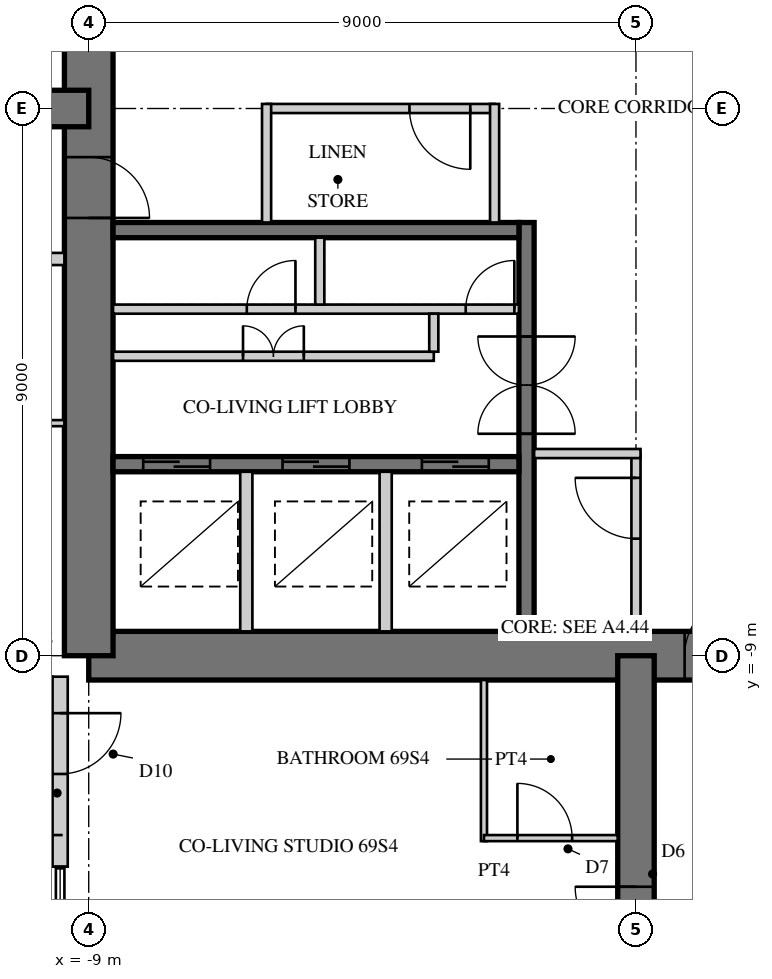
"""IFC4 building model, lengths in metres.
Left out: names, types, materials, properties, quantities, classifications, styles, units other than length and angle.
Written with IfcOpenShell. Run it as: python <this file> out.ifc"""

import sys

from ifc_helpers import new_model, si_unit, direction, frame, frame_2d, origin, place, context, subcontext, project, spatial, rectangle, hollow_rectangle, extrude, element, fill, save


model = new_model("IFC4")
c1 = context("Model", 3, precision=1e-05, world=origin(), true_north=direction((0.0, 1.0)))
c2 = subcontext(c1, "Body", "Model", "MODEL_VIEW")
j1 = project(units=[si_unit("LENGTHUNIT", "METRE"), si_unit("PLANEANGLEUNIT", "RADIAN")], contexts=[c1])
p1 = place(None, origin())
s1 = spatial("IfcSite", under=j1, at=p1, CompositionType="ELEMENT")
p2 = place(p1, origin())
s2 = spatial("IfcBuilding", under=s1, at=p2, CompositionType="ELEMENT")
p3 = place(p2, frame((0.0, 0.0, 267.9)))
s3 = spatial("IfcBuildingStorey", under=s2, at=p3, CompositionType="ELEMENT", Elevation=267.9)
p4 = place(p3, frame((-9.0, -9.0, 0.0), z_axis=(0.0, 0.0, 1.0), x_axis=(1.0, 0.0, 0.0)))
e1 = element("IfcWall", 1, at=p4, inside=s3, PredefinedType="SHEAR", context=c2, shape_type="SweptSolid", body=[
    extrude(rectangle(XDim=18.0, YDim=0.8, at=frame_2d((9.0, 0.0))), origin(), (0.0, 0.0, 1.0), 3.4),
])
p5 = place(p4, frame((9.8, 0.0, 0.0)))
e2 = element("IfcOpeningElement", 2, at=p5, cuts=e1, PredefinedType="OPENING", context=c2, shape_type="SweptSolid", body=[
    extrude(rectangle(XDim=1.0, YDim=2.4, at=frame_2d((0.5, 1.2))), frame((0.0, 0.41, 0.0), z_axis=(0.0, -1.0, 0.0), x_axis=(1.0, 0.0, 0.0)), (0.0, 0.0, 1.0), 0.82),
])
p6 = place(p3, frame((-9.0, 9.0, 0.0), z_axis=(0.0, 0.0, 1.0), x_axis=(0.0, -1.0, 0.0)))
e3 = element("IfcWall", 3, at=p6, inside=s3, PredefinedType="SHEAR", context=c2, shape_type="SweptSolid", body=[
    extrude(rectangle(XDim=18.0, YDim=0.8, at=frame_2d((9.0, 0.0))), origin(), (0.0, 0.0, 1.0), 3.4),
])
p7 = place(p6, frame((9.8, 0.0, 0.0)))
e4 = element("IfcOpeningElement", 4, at=p7, cuts=e3, PredefinedType="OPENING", context=c2, shape_type="SweptSolid", body=[
    extrude(rectangle(XDim=1.0, YDim=2.4, at=frame_2d((0.5, 1.2))), frame((0.0, 0.41, 0.0), z_axis=(0.0, -1.0, 0.0), x_axis=(1.0, 0.0, 0.0)), (0.0, 0.0, 1.0), 0.82),
])
p8 = place(p3, frame((-1.8, -1.875, 0.0), z_axis=(0.0, 0.0, 1.0), x_axis=(0.0, -1.0, 0.0)))
e5 = element("IfcWall", 5, at=p8, inside=s3, PredefinedType="SHEAR", context=c2, shape_type="SweptSolid", body=[
    extrude(rectangle(XDim=6.725, YDim=0.25, at=frame_2d((3.363, 0.0))), origin(), (0.0, 0.0, 1.0), 3.4),
])
p9 = place(p8, frame((1.875, 0.0, 0.0)))
e6 = element("IfcOpeningElement", 6, at=p9, cuts=e5, PredefinedType="OPENING", context=c2, shape_type="SweptSolid", body=[
    extrude(rectangle(XDim=1.6, YDim=2.4, at=frame_2d((0.8, 1.2))), frame((0.0, 0.135, 0.0), z_axis=(0.0, -1.0, 0.0), x_axis=(1.0, 0.0, 0.0)), (0.0, 0.0, 1.0), 0.27),
])
p10 = place(p3, frame((-1.925, -2.0, 0.0), z_axis=(0.0, 0.0, 1.0), x_axis=(-1.0, 0.0, 0.0)))
e7 = element("IfcWall", 7, at=p10, inside=s3, PredefinedType="SHEAR", context=c2, shape_type="SweptSolid", body=[
    extrude(rectangle(XDim=6.675, YDim=0.25, at=frame_2d((3.337, 0.0))), origin(), (0.0, 0.0, 1.0), 3.4),
])
p11 = place(p3, frame((-1.925, -5.85, 0.0), z_axis=(0.0, 0.0, 1.0), x_axis=(-1.0, 0.0, 0.0)))
e8 = element("IfcWall", 8, at=p11, inside=s3, PredefinedType="SHEAR", context=c2, shape_type="SweptSolid", body=[
    extrude(rectangle(XDim=6.675, YDim=0.25, at=frame_2d((3.337, 0.0))), origin(), (0.0, 0.0, 1.0), 3.4),
])
p12 = place(p11, frame((0.496, 0.0, 0.0)))
e9 = element("IfcOpeningElement", 9, at=p12, cuts=e8, PredefinedType="OPENING", context=c2, shape_type="SweptSolid", body=[
    extrude(rectangle(XDim=1.1, YDim=2.2, at=frame_2d((0.55, 1.1))), frame((0.0, 0.135, 0.0), z_axis=(0.0, -1.0, 0.0), x_axis=(1.0, 0.0, 0.0)), (0.0, 0.0, 1.0), 0.27),
])
p13 = place(p11, frame((2.788, 0.0, 0.0)))
e10 = element("IfcOpeningElement", 10, at=p13, cuts=e8, PredefinedType="OPENING", context=c2, shape_type="SweptSolid", body=[
    extrude(rectangle(XDim=1.1, YDim=2.2, at=frame_2d((0.55, 1.1))), frame((0.0, 0.135, 0.0), z_axis=(0.0, -1.0, 0.0), x_axis=(1.0, 0.0, 0.0)), (0.0, 0.0, 1.0), 0.27),
])
p14 = place(p11, frame((5.079, 0.0, 0.0)))
e11 = element("IfcOpeningElement", 11, at=p14, cuts=e8, PredefinedType="OPENING", context=c2, shape_type="SweptSolid", body=[
    extrude(rectangle(XDim=1.1, YDim=2.2, at=frame_2d((0.55, 1.1))), frame((0.0, 0.135, 0.0), z_axis=(0.0, -1.0, 0.0), x_axis=(1.0, 0.0, 0.0)), (0.0, 0.0, 1.0), 0.27),
])
p15 = place(p3, frame((-1.925, -3.3, 0.0), z_axis=(0.0, 0.0, 1.0), x_axis=(-1.0, 0.0, 0.0)))
e12 = element("IfcWall", 12, at=p15, inside=s3, PredefinedType="PARTITIONING", context=c2, shape_type="SweptSolid", body=[
    extrude(rectangle(XDim=6.675, YDim=0.15, at=frame_2d((3.337, 0.0))), origin(), (0.0, 0.0, 1.0), 3.4),
])
p16 = place(p15, frame((0.075, 0.0, 0.0)))
e13 = element("IfcOpeningElement", 13, at=p16, cuts=e12, PredefinedType="OPENING", context=c2, shape_type="SweptSolid", body=[
    extrude(rectangle(XDim=0.8, YDim=2.1, at=frame_2d((0.4, 1.05))), frame((0.0, 0.085, 0.0), z_axis=(0.0, -1.0, 0.0), x_axis=(1.0, 0.0, 0.0)), (0.0, 0.0, 1.0), 0.17),
])
p17 = place(p15, frame((3.675, 0.0, 0.0)))
e14 = element("IfcOpeningElement", 14, at=p17, cuts=e12, PredefinedType="OPENING", context=c2, shape_type="SweptSolid", body=[
    extrude(rectangle(XDim=0.8, YDim=2.1, at=frame_2d((0.4, 1.05))), frame((0.0, 0.085, 0.0), z_axis=(0.0, -1.0, 0.0), x_axis=(1.0, 0.0, 0.0)), (0.0, 0.0, 1.0), 0.17),
])
p18 = place(p3, frame((-5.2, -2.125, 0.0), z_axis=(0.0, 0.0, 1.0), x_axis=(0.0, -1.0, 0.0)))
e15 = element("IfcWall", 15, at=p18, inside=s3, PredefinedType="PARTITIONING", context=c2, shape_type="SweptSolid", body=[
    extrude(rectangle(XDim=1.1, YDim=0.15, at=frame_2d((0.55, 0.0))), origin(), (0.0, 0.0, 1.0), 3.4),
])
for number, where, z_axis, x_axis in (
    (16, (-4.117, -5.975, 0.0), (0.0, 0.0, 1.0), (0.0, -1.0, 0.0)),
    (17, (-6.408, -5.975, 0.0), (0.0, 0.0, 1.0), (0.0, -1.0, 0.0)),
):
    element("IfcWall", number, at=place(p3, frame(where, z_axis=z_axis, x_axis=x_axis)), inside=s3, PredefinedType="PARTITIONING", context=c2, shape_type="SweptSolid", body=[
        extrude(rectangle(XDim=2.625, YDim=0.2, at=frame_2d((1.312, 0.0))), origin(), (0.0, 0.0, 1.0), 3.4),
    ])
p19 = place(p3, frame((0.0, -9.0, 0.0), z_axis=(0.0, 0.0, 1.0), x_axis=(0.0, -1.0, 0.0)))
e18 = element("IfcWall", 18, at=p19, inside=s3, PredefinedType="SHEAR", context=c2, shape_type="SweptSolid", body=[
    extrude(rectangle(XDim=9.0, YDim=0.6, at=frame_2d((4.5, 0.0))), origin(), (0.0, 0.0, 1.0), 3.4),
])
p20 = place(p19, frame((3.8, 0.0, 0.0)))
e19 = element("IfcOpeningElement", 19, at=p20, cuts=e18, PredefinedType="OPENING", context=c2, shape_type="SweptSolid", body=[
    extrude(rectangle(XDim=1.0, YDim=2.15, at=frame_2d((0.5, 1.075))), frame((0.0, 0.31, 0.0), z_axis=(0.0, -1.0, 0.0), x_axis=(1.0, 0.0, 0.0)), (0.0, 0.0, 1.0), 0.62),
])
p21 = place(p19, frame((7.0, 0.0, 0.0)))
e20 = element("IfcOpeningElement", 20, at=p21, cuts=e18, PredefinedType="OPENING", context=c2, shape_type="SweptSolid", body=[
    extrude(rectangle(XDim=1.0, YDim=2.2, at=frame_2d((0.5, 1.1))), frame((0.0, 0.31, 0.0), z_axis=(0.0, -1.0, 0.0), x_axis=(1.0, 0.0, 0.0)), (0.0, 0.0, 1.0), 0.62),
])
p22 = place(p3, frame((-9.0, 0.0, 0.0), z_axis=(0.0, 0.0, 1.0), x_axis=(-1.0, 0.0, 0.0)))
e21 = element("IfcWall", 21, at=p22, inside=s3, PredefinedType="SHEAR", context=c2, shape_type="SweptSolid", body=[
    extrude(rectangle(XDim=9.0, YDim=0.6, at=frame_2d((4.5, 0.0))), origin(), (0.0, 0.0, 1.0), 3.4),
])
p23 = place(p22, frame((3.8, 0.0, 0.0)))
e22 = element("IfcOpeningElement", 22, at=p23, cuts=e21, PredefinedType="OPENING", context=c2, shape_type="SweptSolid", body=[
    extrude(rectangle(XDim=1.0, YDim=2.15, at=frame_2d((0.5, 1.075))), frame((0.0, 0.31, 0.0), z_axis=(0.0, -1.0, 0.0), x_axis=(1.0, 0.0, 0.0)), (0.0, 0.0, 1.0), 0.62),
])
p24 = place(p22, frame((7.0, 0.0, 0.0)))
e23 = element("IfcOpeningElement", 23, at=p24, cuts=e21, PredefinedType="OPENING", context=c2, shape_type="SweptSolid", body=[
    extrude(rectangle(XDim=1.0, YDim=2.2, at=frame_2d((0.5, 1.1))), frame((0.0, 0.31, 0.0), z_axis=(0.0, -1.0, 0.0), x_axis=(1.0, 0.0, 0.0)), (0.0, 0.0, 1.0), 0.62),
])
p25 = place(p3, frame((-12.47, -9.47, 0.0), z_axis=(0.0, 0.0, 1.0), x_axis=(1.0, 0.0, 0.0)))
e24 = element("IfcWall", 24, at=p25, inside=s3, PredefinedType="SOLIDWALL", context=c2, shape_type="SweptSolid", body=[
    extrude(rectangle(XDim=2.875, YDim=0.25, at=frame_2d((1.438, 0.0))), origin(), (0.0, 0.0, 1.0), 3.22),
])
p26 = place(p25, frame((0.6, 0.0, 0.0)))
e25 = element("IfcOpeningElement", 25, at=p26, cuts=e24, PredefinedType="OPENING", context=c2, shape_type="SweptSolid", body=[
    extrude(rectangle(XDim=1.0, YDim=2.2, at=frame_2d((0.5, 1.1))), frame((0.0, 0.135, 0.0), z_axis=(0.0, -1.0, 0.0), x_axis=(1.0, 0.0, 0.0)), (0.0, 0.0, 1.0), 0.27),
])
p27 = place(p3, frame((-9.47, -9.345, 0.0), z_axis=(0.0, 0.0, 1.0), x_axis=(0.0, -1.0, 0.0)))
e26 = element("IfcWall", 26, at=p27, inside=s3, PredefinedType="SOLIDWALL", context=c2, shape_type="SweptSolid", body=[
    extrude(rectangle(XDim=3.125, YDim=0.25, at=frame_2d((1.562, 0.0))), origin(), (0.0, 0.0, 1.0), 3.22),
])
p28 = place(p27, frame((0.6, 0.0, 0.0)))
e27 = element("IfcOpeningElement", 27, at=p28, cuts=e26, PredefinedType="OPENING", context=c2, shape_type="SweptSolid", body=[
    extrude(rectangle(XDim=1.0, YDim=2.2, at=frame_2d((0.5, 1.1))), frame((0.0, 0.135, 0.0), z_axis=(0.0, -1.0, 0.0), x_axis=(1.0, 0.0, 0.0)), (0.0, 0.0, 1.0), 0.27),
])
p29 = place(p3, frame((-2.325, 0.0, 0.0), z_axis=(0.0, 0.0, 1.0), x_axis=(-1.0, 0.0, 0.0)))
e28 = element("IfcWall", 28, at=p29, inside=s3, PredefinedType="PARTITIONING", context=c2, shape_type="SweptSolid", body=[
    extrude(rectangle(XDim=3.75, YDim=0.15, at=frame_2d((1.875, 0.0))), origin(), (0.0, 0.0, 1.0), 3.22),
])
p30 = place(p29, frame((0.4, 0.0, 0.0)))
e29 = element("IfcOpeningElement", 29, at=p30, cuts=e28, PredefinedType="OPENING", context=c2, shape_type="SweptSolid", body=[
    extrude(rectangle(XDim=1.0, YDim=2.1, at=frame_2d((0.5, 1.05))), frame((0.0, 0.085, 0.0), z_axis=(0.0, -1.0, 0.0), x_axis=(1.0, 0.0, 0.0)), (0.0, 0.0, 1.0), 0.17),
])
for number, where, z_axis, x_axis in (
    (30, (-2.325, -1.875, 0.0), (0.0, 0.0, 1.0), (0.0, 1.0, 0.0)),
    (31, (-6.075, 0.075, 0.0), (0.0, 0.0, 1.0), (0.0, -1.0, 0.0)),
):
    element("IfcWall", number, at=place(p3, frame(where, z_axis=z_axis, x_axis=x_axis)), inside=s3, PredefinedType="PARTITIONING", context=c2, shape_type="SweptSolid", body=[
        extrude(rectangle(XDim=1.95, YDim=0.15, at=frame_2d((0.975, 0.0))), origin(), (0.0, 0.0, 1.0), 3.22),
    ])
p31 = place(p3, frame((0.0, -5.675, 0.0), z_axis=(0.0, 0.0, 1.0), x_axis=(0.0, -1.0, 0.0)))
e32 = element("IfcWall", 32, at=p31, inside=s3, PredefinedType="PARTITIONING", context=c2, shape_type="SweptSolid", body=[
    extrude(rectangle(XDim=2.925, YDim=0.15, at=frame_2d((1.462, 0.0))), origin(), (0.0, 0.0, 1.0), 3.22),
])
p32 = place(p31, frame((0.4, 0.0, 0.0)))
e33 = element("IfcOpeningElement", 33, at=p32, cuts=e32, PredefinedType="OPENING", context=c2, shape_type="SweptSolid", body=[
    extrude(rectangle(XDim=1.0, YDim=2.1, at=frame_2d((0.5, 1.05))), frame((0.0, 0.085, 0.0), z_axis=(0.0, -1.0, 0.0), x_axis=(1.0, 0.0, 0.0)), (0.0, 0.0, 1.0), 0.17),
])
p33 = place(p3, frame((-1.675, -5.675, 0.0), z_axis=(0.0, 0.0, 1.0), x_axis=(1.0, 0.0, 0.0)))
e34 = element("IfcWall", 34, at=p33, inside=s3, PredefinedType="PARTITIONING", context=c2, shape_type="SweptSolid", body=[
    extrude(rectangle(XDim=1.75, YDim=0.15, at=frame_2d((0.875, 0.0))), origin(), (0.0, 0.0, 1.0), 3.22),
])
p34 = place(p3, frame((-3.325, -4.075, 0.0), z_axis=(0.0, 0.0, 1.0), x_axis=(-1.0, 0.0, 0.0)))
e35 = element("IfcWall", 35, at=p34, inside=s3, PredefinedType="PARTITIONING", context=c2, shape_type="SweptSolid", body=[
    extrude(rectangle(XDim=5.275, YDim=0.15, at=frame_2d((2.638, 0.0))), origin(), (0.0, 0.0, 1.0), 3.22),
])
p35 = place(p34, frame((2.137, 0.0, 0.0)))
e36 = element("IfcOpeningElement", 36, at=p35, cuts=e35, PredefinedType="OPENING", context=c2, shape_type="SweptSolid", body=[
    extrude(rectangle(XDim=1.0, YDim=2.1, at=frame_2d((0.5, 1.05))), frame((0.0, 0.085, 0.0), z_axis=(0.0, -1.0, 0.0), x_axis=(1.0, 0.0, 0.0)), (0.0, 0.0, 1.0), 0.17),
])
p36 = place(p3, frame((-3.325, -3.375, 0.0), z_axis=(0.0, 0.0, 1.0), x_axis=(0.0, -1.0, 0.0)))
e37 = element("IfcWall", 37, at=p36, inside=s3, PredefinedType="PARTITIONING", context=c2, shape_type="SweptSolid", body=[
    extrude(rectangle(XDim=0.625, YDim=0.15, at=frame_2d((0.312, 0.0))), origin(), (0.0, 0.0, 1.0), 3.22),
])
p37 = place(p3, frame((-2.5, -9.4, 0.0), z_axis=(0.0, 0.0, 1.0), x_axis=(0.0, -1.0, 0.0)))
e38 = element("IfcWall", 38, at=p37, inside=s3, PredefinedType="PARTITIONING", context=c2, shape_type="SweptSolid", body=[
    extrude(rectangle(XDim=2.65, YDim=0.1, at=frame_2d((1.325, 0.0))), origin(), (0.0, 0.0, 1.0), 3.22),
])
p38 = place(p3, frame((-2.5, -12.0, 0.0), z_axis=(0.0, 0.0, 1.0), x_axis=(1.0, 0.0, 0.0)))
e39 = element("IfcWall", 39, at=p38, inside=s3, PredefinedType="PARTITIONING", context=c2, shape_type="SweptSolid", body=[
    extrude(rectangle(XDim=2.2, YDim=0.1, at=frame_2d((1.1, 0.0))), origin(), (0.0, 0.0, 1.0), 3.22),
])
p39 = place(p38, frame((0.55, 0.0, 0.0)))
e40 = element("IfcOpeningElement", 40, at=p39, cuts=e39, PredefinedType="OPENING", context=c2, shape_type="SweptSolid", body=[
    extrude(rectangle(XDim=0.9, YDim=2.1, at=frame_2d((0.45, 1.05))), frame((0.0, 0.06, 0.0), z_axis=(0.0, -1.0, 0.0), x_axis=(1.0, 0.0, 0.0)), (0.0, 0.0, 1.0), 0.12),
])
p40 = place(p3, frame((-9.4, -5.175, 0.0), z_axis=(0.0, 0.0, 1.0), x_axis=(-1.0, 0.0, 0.0)))
e41 = element("IfcWall", 41, at=p40, inside=s3, PredefinedType="PARTITIONING", context=c2, shape_type="SweptSolid", body=[
    extrude(rectangle(XDim=2.85, YDim=0.1, at=frame_2d((1.425, 0.0))), origin(), (0.0, 0.0, 1.0), 3.22),
])
p41 = place(p3, frame((-9.4, -2.475, 0.0), z_axis=(0.0, 0.0, 1.0), x_axis=(-1.0, 0.0, 0.0)))
e42 = element("IfcWall", 42, at=p41, inside=s3, PredefinedType="SOLIDWALL", context=c2, shape_type="SweptSolid", body=[
    extrude(rectangle(XDim=5.6, YDim=0.2, at=frame_2d((2.8, 0.0))), origin(), (0.0, 0.0, 1.0), 3.22),
])
p42 = place(p41, frame((3.4, 0.0, 0.0)))
e43 = element("IfcOpeningElement", 43, at=p42, cuts=e42, PredefinedType="OPENING", context=c2, shape_type="SweptSolid", body=[
    extrude(rectangle(XDim=1.0, YDim=2.15, at=frame_2d((0.5, 1.075))), frame((0.0, 0.11, 0.0), z_axis=(0.0, -1.0, 0.0), x_axis=(1.0, 0.0, 0.0)), (0.0, 0.0, 1.0), 0.22),
])
p43 = place(p28, origin())
e44 = element("IfcDoor", 44, at=p43, inside=s3, OperationType="SINGLE_SWING_LEFT", PredefinedType="DOOR", context=c2, shape_type="SweptSolid", body=[
    extrude(hollow_rectangle(XDim=1.0, YDim=2.2, WallThickness=0.06, at=frame_2d((0.5, 1.1))), frame((0.0, 0.025, 0.0), z_axis=(0.0, -1.0, 0.0), x_axis=(1.0, 0.0, 0.0)), (0.0, 0.0, 1.0), 0.05),
    extrude(rectangle(XDim=0.879, YDim=2.079, at=frame_2d((0.5, 1.1))), frame((0.0, 0.025, 0.0), z_axis=(0.0, -1.0, 0.0), x_axis=(1.0, 0.0, 0.0)), (0.0, 0.0, 1.0), 0.05),
])
fill(e27, e44)
p44 = place(p30, origin())
e45 = element("IfcDoor", 45, at=p44, inside=s3, OperationType="SINGLE_SWING_LEFT", PredefinedType="DOOR", context=c2, shape_type="SweptSolid", body=[
    extrude(rectangle(XDim=1.0, YDim=2.1, at=frame_2d((0.5, 1.05))), frame((0.0, 0.025, 0.0), z_axis=(0.0, -1.0, 0.0), x_axis=(1.0, 0.0, 0.0)), (0.0, 0.0, 1.0), 0.05),
])
fill(e29, e45)
p45 = place(p32, frame((1.0, 0.0, 0.0), z_axis=(0.0, 0.0, 1.0), x_axis=(-1.0, 0.0, 0.0)))
e46 = element("IfcDoor", 46, at=p45, inside=s3, OperationType="SINGLE_SWING_RIGHT", PredefinedType="DOOR", context=c2, shape_type="SweptSolid", body=[
    extrude(rectangle(XDim=1.0, YDim=2.1, at=frame_2d((0.5, 1.05))), frame((0.0, 0.025, 0.0), z_axis=(0.0, -1.0, 0.0), x_axis=(1.0, 0.0, 0.0)), (0.0, 0.0, 1.0), 0.05),
])
fill(e33, e46)
p46 = place(p35, frame((1.0, 0.0, 0.0), z_axis=(0.0, 0.0, 1.0), x_axis=(-1.0, 0.0, 0.0)))
e47 = element("IfcDoor", 47, at=p46, inside=s3, OperationType="DOUBLE_DOOR_SINGLE_SWING", PredefinedType="DOOR", context=c2, shape_type="SweptSolid", body=[
    extrude(rectangle(XDim=1.0, YDim=2.1, at=frame_2d((0.5, 1.05))), frame((0.0, 0.025, 0.0), z_axis=(0.0, -1.0, 0.0), x_axis=(1.0, 0.0, 0.0)), (0.0, 0.0, 1.0), 0.05),
])
fill(e36, e47)
p47 = place(p39, origin())
e48 = element("IfcDoor", 48, at=p47, inside=s3, OperationType="SINGLE_SWING_LEFT", PredefinedType="DOOR", context=c2, shape_type="SweptSolid", body=[
    extrude(rectangle(XDim=0.9, YDim=2.1, at=frame_2d((0.45, 1.05))), frame((0.0, 0.025, 0.0), z_axis=(0.0, -1.0, 0.0), x_axis=(1.0, 0.0, 0.0)), (0.0, 0.0, 1.0), 0.05),
])
fill(e40, e48)
p48 = place(p20, frame((1.0, 0.0, 0.0), z_axis=(0.0, 0.0, 1.0), x_axis=(-1.0, 0.0, 0.0)))
e49 = element("IfcDoor", 49, at=p48, inside=s3, OperationType="SINGLE_SWING_RIGHT", PredefinedType="DOOR", context=c2, shape_type="SweptSolid", body=[
    extrude(rectangle(XDim=1.0, YDim=2.15, at=frame_2d((0.5, 1.075))), frame((0.0, 0.025, 0.0), z_axis=(0.0, -1.0, 0.0), x_axis=(1.0, 0.0, 0.0)), (0.0, 0.0, 1.0), 0.05),
])
fill(e19, e49)
p49 = place(p5, origin())
e50 = element("IfcDoor", 50, at=p49, inside=s3, OperationType="SINGLE_SWING_RIGHT", PredefinedType="DOOR", context=c2, shape_type="SweptSolid", body=[
    extrude(rectangle(XDim=1.0, YDim=2.4, at=frame_2d((0.5, 1.2))), frame((0.0, 0.055, 0.0), z_axis=(0.0, -1.0, 0.0), x_axis=(1.0, 0.0, 0.0)), (0.0, 0.0, 1.0), 0.05),
])
fill(e2, e50)
p50 = place(p7, origin())
e51 = element("IfcDoor", 51, at=p50, inside=s3, OperationType="SINGLE_SWING_RIGHT", PredefinedType="DOOR", context=c2, shape_type="SweptSolid", body=[
    extrude(rectangle(XDim=1.0, YDim=2.4, at=frame_2d((0.5, 1.2))), frame((0.0, 0.055, 0.0), z_axis=(0.0, -1.0, 0.0), x_axis=(1.0, 0.0, 0.0)), (0.0, 0.0, 1.0), 0.05),
])
fill(e4, e51)
p51 = place(p12, origin())
e52 = element("IfcDoor", 52, at=p51, inside=s3, OperationType="DOUBLE_DOOR_SLIDING", PredefinedType="DOOR", context=c2, shape_type="SweptSolid", body=[
    extrude(rectangle(XDim=1.1, YDim=2.2, at=frame_2d((0.55, 1.1))), frame((0.0, 0.025, 0.0), z_axis=(0.0, -1.0, 0.0), x_axis=(1.0, 0.0, 0.0)), (0.0, 0.0, 1.0), 0.05),
])
fill(e9, e52)
p52 = place(p13, origin())
e53 = element("IfcDoor", 53, at=p52, inside=s3, OperationType="DOUBLE_DOOR_SLIDING", PredefinedType="DOOR", context=c2, shape_type="SweptSolid", body=[
    extrude(rectangle(XDim=1.1, YDim=2.2, at=frame_2d((0.55, 1.1))), frame((0.0, 0.025, 0.0), z_axis=(0.0, -1.0, 0.0), x_axis=(1.0, 0.0, 0.0)), (0.0, 0.0, 1.0), 0.05),
])
fill(e10, e53)
p53 = place(p14, origin())
e54 = element("IfcDoor", 54, at=p53, inside=s3, OperationType="DOUBLE_DOOR_SLIDING", PredefinedType="DOOR", context=c2, shape_type="SweptSolid", body=[
    extrude(rectangle(XDim=1.1, YDim=2.2, at=frame_2d((0.55, 1.1))), frame((0.0, 0.025, 0.0), z_axis=(0.0, -1.0, 0.0), x_axis=(1.0, 0.0, 0.0)), (0.0, 0.0, 1.0), 0.05),
])
fill(e11, e54)
p54 = place(p9, origin())
e55 = element("IfcDoor", 55, at=p54, inside=s3, OperationType="DOUBLE_DOOR_DOUBLE_SWING", PredefinedType="DOOR", context=c2, shape_type="SweptSolid", body=[
    extrude(rectangle(XDim=1.6, YDim=2.4, at=frame_2d((0.8, 1.2))), frame((0.0, 0.025, 0.0), z_axis=(0.0, -1.0, 0.0), x_axis=(1.0, 0.0, 0.0)), (0.0, 0.0, 1.0), 0.05),
])
fill(e6, e55)
p55 = place(p16, frame((0.8, 0.0, 0.0), z_axis=(0.0, 0.0, 1.0), x_axis=(-1.0, 0.0, 0.0)))
e56 = element("IfcDoor", 56, at=p55, inside=s3, OperationType="SINGLE_SWING_RIGHT", PredefinedType="DOOR", context=c2, shape_type="SweptSolid", body=[
    extrude(rectangle(XDim=0.8, YDim=2.1, at=frame_2d((0.4, 1.05))), frame((0.0, 0.025, 0.0), z_axis=(0.0, -1.0, 0.0), x_axis=(1.0, 0.0, 0.0)), (0.0, 0.0, 1.0), 0.05),
])
fill(e13, e56)
p56 = place(p17, frame((0.8, 0.0, 0.0), z_axis=(0.0, 0.0, 1.0), x_axis=(-1.0, 0.0, 0.0)))
e57 = element("IfcDoor", 57, at=p56, inside=s3, OperationType="SINGLE_SWING_RIGHT", PredefinedType="DOOR", context=c2, shape_type="SweptSolid", body=[
    extrude(rectangle(XDim=0.8, YDim=2.1, at=frame_2d((0.4, 1.05))), frame((0.0, 0.025, 0.0), z_axis=(0.0, -1.0, 0.0), x_axis=(1.0, 0.0, 0.0)), (0.0, 0.0, 1.0), 0.05),
])
fill(e14, e57)
save(model, sys.argv[1])
